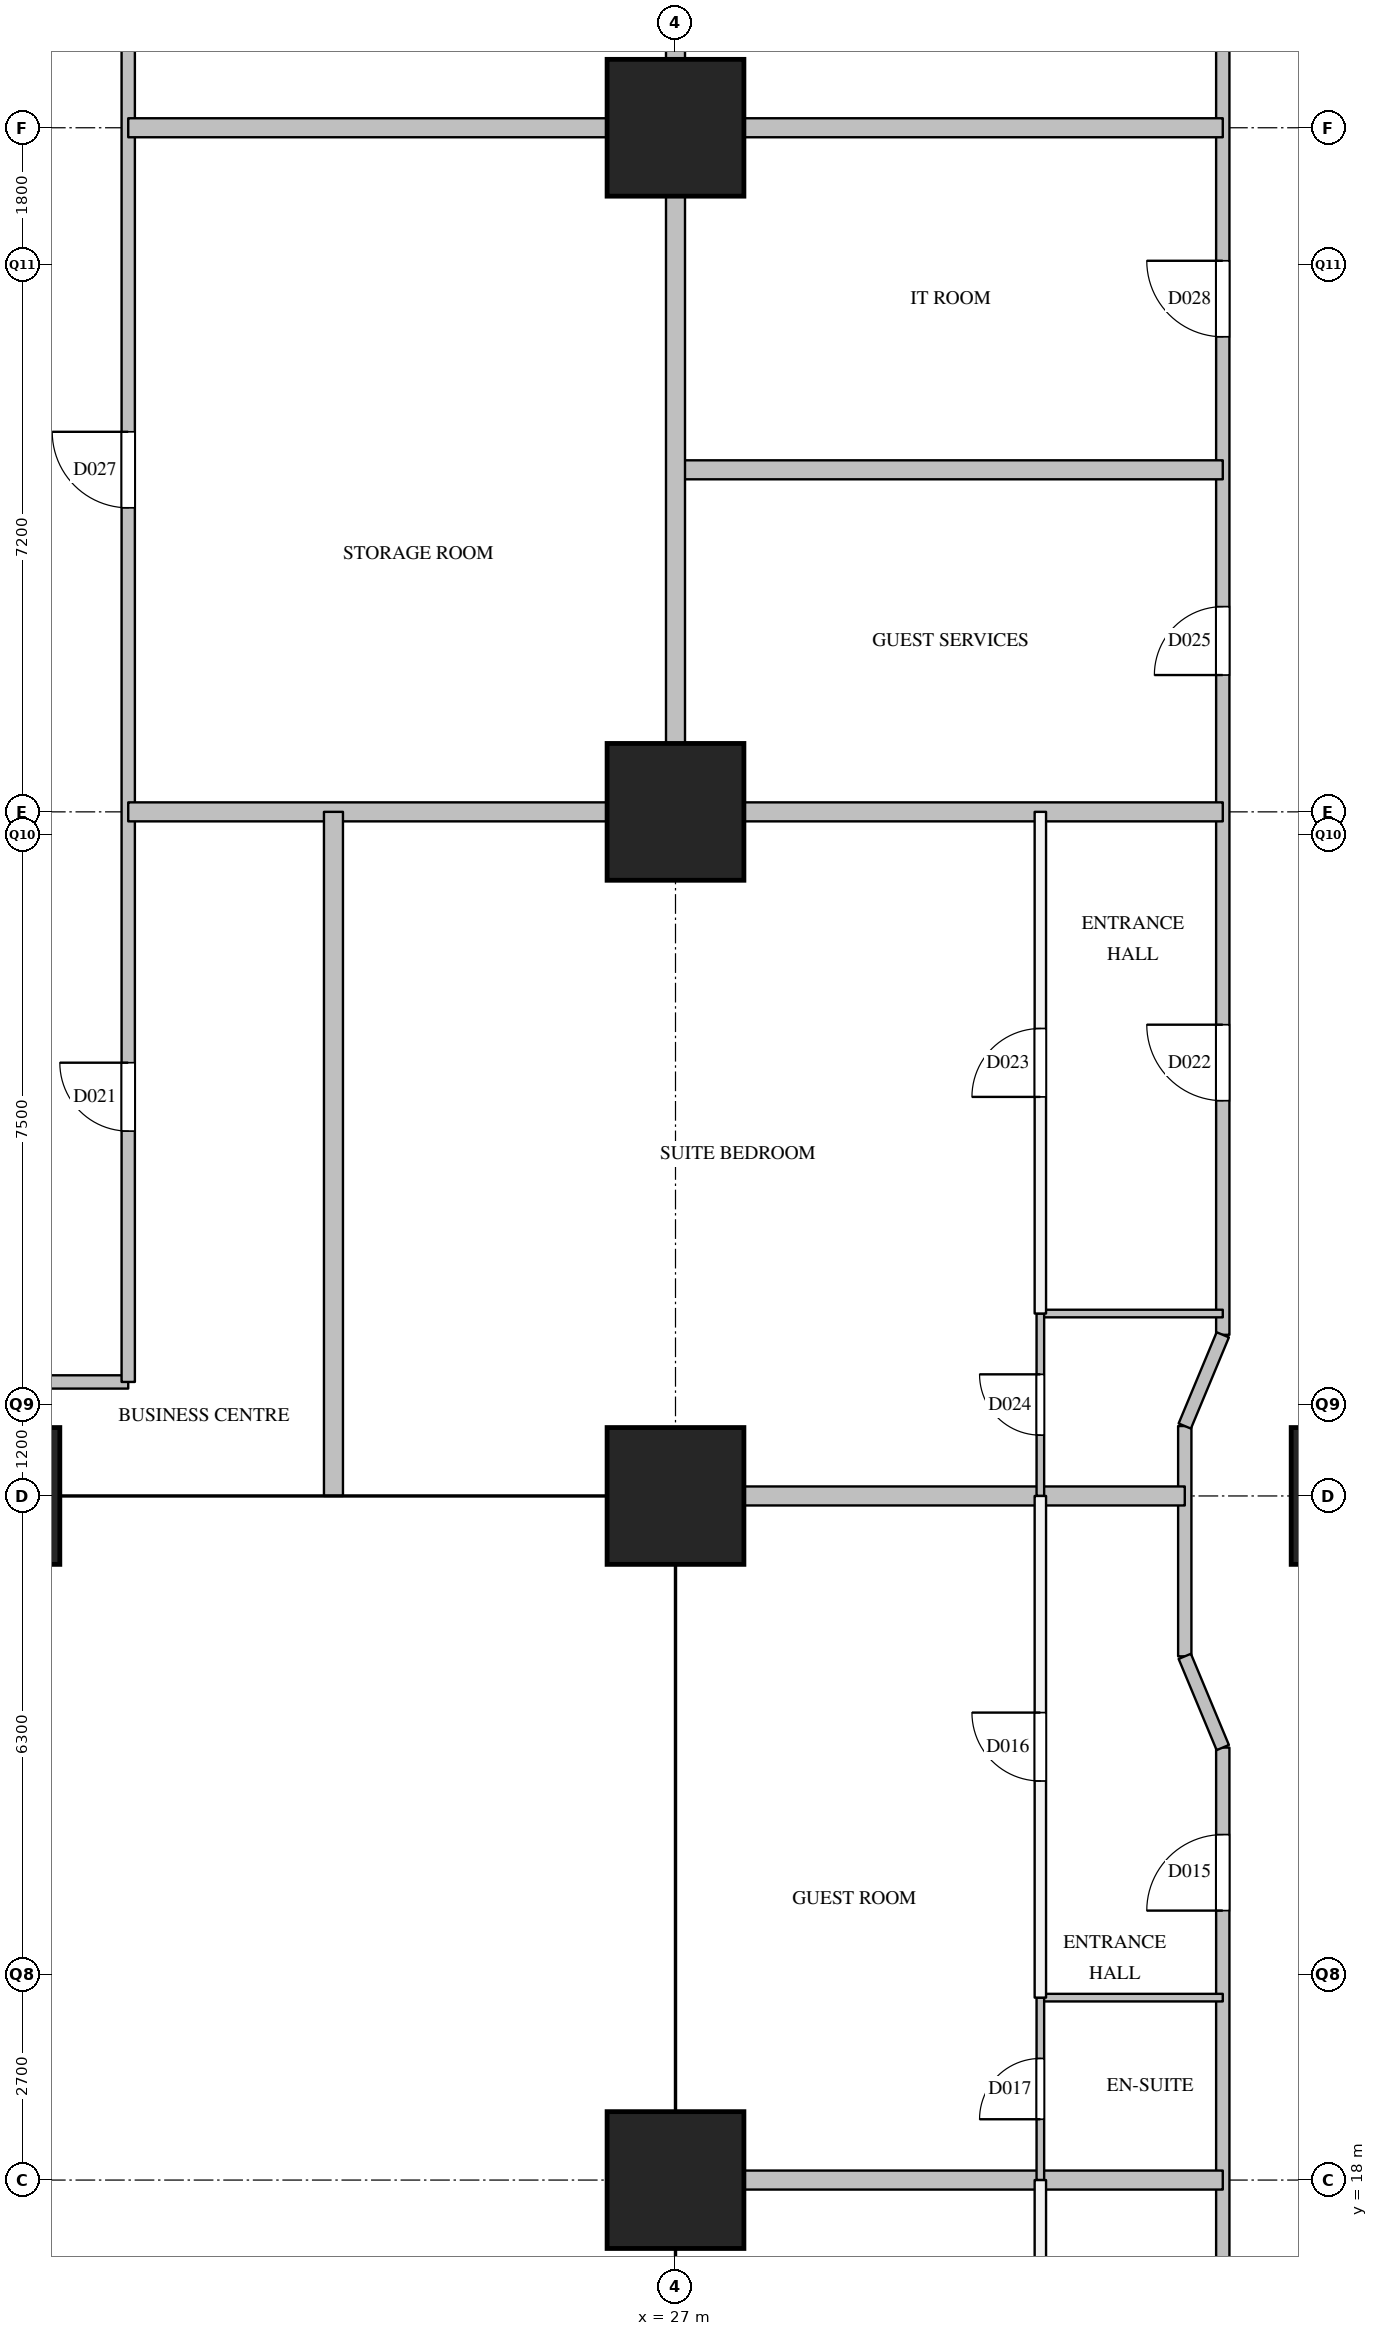
"""IFC4 building model, lengths in metres.
Left out: names, types, materials, properties, quantities, classifications, styles, units other than length and angle.
Written with IfcOpenShell. Run it as: python <this file> out.ifc"""

import sys

from ifc_helpers import new_model, si_unit, direction, frame, frame_2d, origin, origin_2d, place, context, subcontext, project, spatial, rectangle, extrude, element, fill, save


model = new_model("IFC4")
c1 = context("Model", 3, precision=1e-05, world=origin(), true_north=direction((0.0, 1.0)))
c2 = subcontext(c1, "Body", "Model", "MODEL_VIEW")
j1 = project(units=[si_unit("LENGTHUNIT", "METRE"), si_unit("PLANEANGLEUNIT", "RADIAN")], contexts=[c1])
p1 = place(None, origin())
s1 = spatial("IfcSite", under=j1, at=p1, CompositionType="ELEMENT")
p2 = place(p1, origin())
s2 = spatial("IfcBuilding", under=s1, at=p2, CompositionType="ELEMENT")
p3 = place(p2, frame((0.0, 0.0, 104.4)))
s3 = spatial("IfcBuildingStorey", under=s2, at=p3, CompositionType="ELEMENT", Elevation=104.4)
for number, where, z_axis, x_axis in (
    (1, (18.0, 27.0, 0.0), (0.0, 0.0, 1.0), (1.0, 0.0, 0.0)),
    (2, (27.0, 18.0, 0.0), (0.0, 0.0, 1.0), (1.0, 0.0, 0.0)),
    (3, (27.0, 27.0, 0.0), (0.0, 0.0, 1.0), (1.0, 0.0, 0.0)),
    (4, (27.0, 36.0, 0.0), (0.0, 0.0, 1.0), (1.0, 0.0, 0.0)),
    (5, (27.0, 45.0, 0.0), (0.0, 0.0, 1.0), (1.0, 0.0, 0.0)),
    (6, (36.0, 27.0, 0.0), (0.0, 0.0, 1.0), (1.0, 0.0, 0.0)),
):
    element("IfcColumn", number, at=place(p3, frame(where, z_axis=z_axis, x_axis=x_axis)), inside=s3, PredefinedType="COLUMN", context=c2, shape_type="SweptSolid", body=[
        extrude(rectangle(XDim=1.8, YDim=1.8, at=origin_2d()), origin(), (0.0, 0.0, 1.0), 3.8),
    ])
p4 = place(p3, frame((18.0, 28.5, 0.0), z_axis=(0.0, 0.0, 1.0), x_axis=(1.0, 0.0, 0.0)))
e7 = element("IfcWall", 7, at=p4, inside=s3, PredefinedType="PARTITIONING", context=c2, shape_type="SweptSolid", body=[
    extrude(rectangle(XDim=1.8, YDim=0.175, at=frame_2d((0.9, 0.0))), origin(), (0.0, 0.0, 1.0), 3.5),
])
p5 = place(p3, frame((19.8, 28.5, 0.0), z_axis=(0.0, 0.0, 1.0), x_axis=(0.0, 1.0, 0.0)))
e8 = element("IfcWall", 8, at=p5, inside=s3, PredefinedType="PARTITIONING", context=c2, shape_type="SweptSolid", body=[
    extrude(rectangle(XDim=23.3, YDim=0.175, at=frame_2d((11.65, 0.0))), origin(), (0.0, 0.0, 1.0), 3.5),
])
p6 = place(p5, frame((3.3, 0.0, 0.0)))
e9 = element("IfcOpeningElement", 9, at=p6, cuts=e8, PredefinedType="OPENING", context=c2, shape_type="SweptSolid", body=[
    extrude(rectangle(XDim=0.9, YDim=2.1, at=frame_2d((0.45, 1.05))), frame((0.0, 0.097, 0.0), z_axis=(0.0, -1.0, 0.0), x_axis=(1.0, 0.0, 0.0)), (0.0, 0.0, 1.0), 0.195),
])
p7 = place(p5, frame((11.5, 0.0, 0.0)))
e10 = element("IfcOpeningElement", 10, at=p7, cuts=e8, PredefinedType="OPENING", context=c2, shape_type="SweptSolid", body=[
    extrude(rectangle(XDim=1.0, YDim=2.1, at=frame_2d((0.5, 1.05))), frame((0.0, 0.097, 0.0), z_axis=(0.0, -1.0, 0.0), x_axis=(1.0, 0.0, 0.0)), (0.0, 0.0, 1.0), 0.195),
])
p8 = place(p5, frame((19.45, 0.0, 0.0)))
e11 = element("IfcOpeningElement", 11, at=p8, cuts=e8, PredefinedType="OPENING", context=c2, shape_type="SweptSolid", body=[
    extrude(rectangle(XDim=0.9, YDim=2.1, at=frame_2d((0.45, 1.05))), frame((0.0, 0.097, 0.0), z_axis=(0.0, -1.0, 0.0), x_axis=(1.0, 0.0, 0.0)), (0.0, 0.0, 1.0), 0.195),
])
p9 = place(p3, frame((33.7, 24.89, 0.0), z_axis=(0.0, 0.0, 1.0), x_axis=(0.0, 1.0, 0.0)))
e12 = element("IfcWall", 12, at=p9, inside=s3, PredefinedType="PARTITIONING", context=c2, shape_type="SweptSolid", body=[
    extrude(rectangle(XDim=3.03, YDim=0.175, at=frame_2d((1.515, 0.0))), origin(), (0.0, 0.0, 1.0), 2.5),
])
p10 = place(p3, frame((34.2, 7.2, 0.0), z_axis=(0.0, 0.0, 1.0), x_axis=(0.0, 1.0, 0.0)))
e13 = element("IfcWall", 13, at=p10, inside=s3, PredefinedType="PARTITIONING", context=c2, shape_type="SweptSolid", body=[
    extrude(rectangle(XDim=16.49, YDim=0.175, at=frame_2d((8.245, 0.0))), origin(), (0.0, 0.0, 1.0), 3.5),
])
p11 = place(p10, frame((0.45, 0.0, 0.0)))
e14 = element("IfcOpeningElement", 14, at=p11, cuts=e13, PredefinedType="OPENING", context=c2, shape_type="SweptSolid", body=[
    extrude(rectangle(XDim=0.9, YDim=2.1, at=frame_2d((0.45, 1.05))), frame((0.0, 0.097, 0.0), z_axis=(0.0, -1.0, 0.0), x_axis=(1.0, 0.0, 0.0)), (0.0, 0.0, 1.0), 0.195),
])
p12 = place(p10, frame((7.0, 0.0, 0.0)))
e15 = element("IfcOpeningElement", 15, at=p12, cuts=e13, PredefinedType="OPENING", context=c2, shape_type="SweptSolid", body=[
    extrude(rectangle(XDim=1.0, YDim=2.1, at=frame_2d((0.5, 1.05))), frame((0.0, 0.097, 0.0), z_axis=(0.0, -1.0, 0.0), x_axis=(1.0, 0.0, 0.0)), (0.0, 0.0, 1.0), 0.195),
])
p13 = place(p10, frame((14.345, 0.0, 0.0)))
e16 = element("IfcOpeningElement", 16, at=p13, cuts=e13, PredefinedType="OPENING", context=c2, shape_type="SweptSolid", body=[
    extrude(rectangle(XDim=1.0, YDim=2.1, at=frame_2d((0.5, 1.05))), frame((0.0, 0.097, 0.0), z_axis=(0.0, -1.0, 0.0), x_axis=(1.0, 0.0, 0.0)), (0.0, 0.0, 1.0), 0.195),
])
p14 = place(p3, frame((34.2, 29.12, 0.0), z_axis=(0.0, 0.0, 1.0), x_axis=(0.0, 1.0, 0.0)))
e17 = element("IfcWall", 17, at=p14, inside=s3, PredefinedType="PARTITIONING", context=c2, shape_type="SweptSolid", body=[
    extrude(rectangle(XDim=22.68, YDim=0.175, at=frame_2d((11.34, 0.0))), origin(), (0.0, 0.0, 1.0), 3.5),
])
p15 = place(p14, frame((3.08, 0.0, 0.0)))
e18 = element("IfcOpeningElement", 18, at=p15, cuts=e17, PredefinedType="OPENING", context=c2, shape_type="SweptSolid", body=[
    extrude(rectangle(XDim=1.0, YDim=2.1, at=frame_2d((0.5, 1.05))), frame((0.0, 0.097, 0.0), z_axis=(0.0, -1.0, 0.0), x_axis=(1.0, 0.0, 0.0)), (0.0, 0.0, 1.0), 0.195),
])
p16 = place(p14, frame((8.68, 0.0, 0.0)))
e19 = element("IfcOpeningElement", 19, at=p16, cuts=e17, PredefinedType="OPENING", context=c2, shape_type="SweptSolid", body=[
    extrude(rectangle(XDim=0.9, YDim=2.1, at=frame_2d((0.45, 1.05))), frame((0.0, 0.097, 0.0), z_axis=(0.0, -1.0, 0.0), x_axis=(1.0, 0.0, 0.0)), (0.0, 0.0, 1.0), 0.195),
])
p17 = place(p14, frame((13.13, 0.0, 0.0)))
e20 = element("IfcOpeningElement", 20, at=p17, cuts=e17, PredefinedType="OPENING", context=c2, shape_type="SweptSolid", body=[
    extrude(rectangle(XDim=1.0, YDim=2.1, at=frame_2d((0.5, 1.05))), frame((0.0, 0.097, 0.0), z_axis=(0.0, -1.0, 0.0), x_axis=(1.0, 0.0, 0.0)), (0.0, 0.0, 1.0), 0.195),
])
p18 = place(p14, frame((18.83, 0.0, 0.0)))
e21 = element("IfcOpeningElement", 21, at=p18, cuts=e17, PredefinedType="OPENING", context=c2, shape_type="SweptSolid", body=[
    extrude(rectangle(XDim=0.9, YDim=2.1, at=frame_2d((0.45, 1.05))), frame((0.0, 0.097, 0.0), z_axis=(0.0, -1.0, 0.0), x_axis=(1.0, 0.0, 0.0)), (0.0, 0.0, 1.0), 0.195),
])
p19 = place(p3, frame((31.8, 11.4, 0.0), z_axis=(0.0, 0.0, 1.0), x_axis=(0.0, 1.0, 0.0)))
e22 = element("IfcWall", 22, at=p19, inside=s3, PredefinedType="PARTITIONING", context=c2, shape_type="SweptSolid", body=[
    extrude(rectangle(XDim=6.6, YDim=0.15, at=frame_2d((3.3, 0.0))), origin(), (0.0, 0.0, 1.0), 3.5),
])
p20 = place(p19, frame((2.85, 0.0, 0.0)))
e23 = element("IfcOpeningElement", 23, at=p20, cuts=e22, PredefinedType="OPENING", context=c2, shape_type="SweptSolid", body=[
    extrude(rectangle(XDim=0.9, YDim=2.1, at=frame_2d((0.45, 1.05))), frame((0.0, 0.085, 0.0), z_axis=(0.0, -1.0, 0.0), x_axis=(1.0, 0.0, 0.0)), (0.0, 0.0, 1.0), 0.17),
])
p21 = place(p3, frame((31.8, 20.4, 0.0), z_axis=(0.0, 0.0, 1.0), x_axis=(0.0, 1.0, 0.0)))
e24 = element("IfcWall", 24, at=p21, inside=s3, PredefinedType="PARTITIONING", context=c2, shape_type="SweptSolid", body=[
    extrude(rectangle(XDim=6.6, YDim=0.15, at=frame_2d((3.3, 0.0))), origin(), (0.0, 0.0, 1.0), 2.5),
])
p22 = place(p21, frame((2.85, 0.0, 0.0)))
e25 = element("IfcOpeningElement", 25, at=p22, cuts=e24, PredefinedType="OPENING", context=c2, shape_type="SweptSolid", body=[
    extrude(rectangle(XDim=0.9, YDim=2.1, at=frame_2d((0.45, 1.05))), frame((0.0, 0.085, 0.0), z_axis=(0.0, -1.0, 0.0), x_axis=(1.0, 0.0, 0.0)), (0.0, 0.0, 1.0), 0.17),
])
p23 = place(p3, frame((31.8, 29.4, 0.0), z_axis=(0.0, 0.0, 1.0), x_axis=(0.0, 1.0, 0.0)))
e26 = element("IfcWall", 26, at=p23, inside=s3, PredefinedType="PARTITIONING", context=c2, shape_type="SweptSolid", body=[
    extrude(rectangle(XDim=6.6, YDim=0.15, at=frame_2d((3.3, 0.0))), origin(), (0.0, 0.0, 1.0), 3.5),
])
p24 = place(p23, frame((2.85, 0.0, 0.0)))
e27 = element("IfcOpeningElement", 27, at=p24, cuts=e26, PredefinedType="OPENING", context=c2, shape_type="SweptSolid", body=[
    extrude(rectangle(XDim=0.9, YDim=2.1, at=frame_2d((0.45, 1.05))), frame((0.0, 0.085, 0.0), z_axis=(0.0, -1.0, 0.0), x_axis=(1.0, 0.0, 0.0)), (0.0, 0.0, 1.0), 0.17),
])
p25 = place(p3, frame((27.0, 18.0, 0.0), z_axis=(0.0, 0.0, 1.0), x_axis=(1.0, 0.0, 0.0)))
e28 = element("IfcWall", 28, at=p25, inside=s3, PredefinedType="PARTITIONING", context=c2, shape_type="SweptSolid", body=[
    extrude(rectangle(XDim=7.2, YDim=0.25, at=frame_2d((3.6, 0.0))), origin(), (0.0, 0.0, 1.0), 3.5),
])
p26 = place(p3, frame((27.0, 27.0, 0.0), z_axis=(0.0, 0.0, 1.0), x_axis=(1.0, 0.0, 0.0)))
e29 = element("IfcWall", 29, at=p26, inside=s3, PredefinedType="PARTITIONING", context=c2, shape_type="SweptSolid", body=[
    extrude(rectangle(XDim=6.7, YDim=0.25, at=frame_2d((3.35, 0.0))), origin(), (0.0, 0.0, 1.0), 2.5),
])
p27 = place(p3, frame((19.8, 36.0, 0.0), z_axis=(0.0, 0.0, 1.0), x_axis=(1.0, 0.0, 0.0)))
e30 = element("IfcWall", 30, at=p27, inside=s3, PredefinedType="PARTITIONING", context=c2, shape_type="SweptSolid", body=[
    extrude(rectangle(XDim=14.4, YDim=0.25, at=frame_2d((7.2, 0.0))), origin(), (0.0, 0.0, 1.0), 3.5),
])
p28 = place(p3, frame((27.0, 40.5, 0.0), z_axis=(0.0, 0.0, 1.0), x_axis=(1.0, 0.0, 0.0)))
e31 = element("IfcWall", 31, at=p28, inside=s3, PredefinedType="PARTITIONING", context=c2, shape_type="SweptSolid", body=[
    extrude(rectangle(XDim=7.2, YDim=0.25, at=frame_2d((3.6, 0.0))), origin(), (0.0, 0.0, 1.0), 2.5),
])
p29 = place(p3, frame((19.8, 45.0, 0.0), z_axis=(0.0, 0.0, 1.0), x_axis=(1.0, 0.0, 0.0)))
e32 = element("IfcWall", 32, at=p29, inside=s3, PredefinedType="PARTITIONING", context=c2, shape_type="SweptSolid", body=[
    extrude(rectangle(XDim=14.4, YDim=0.25, at=frame_2d((7.2, 0.0))), origin(), (0.0, 0.0, 1.0), 3.5),
])
p30 = place(p3, frame((22.5, 27.0, 0.0), z_axis=(0.0, 0.0, 1.0), x_axis=(0.0, 1.0, 0.0)))
e33 = element("IfcWall", 33, at=p30, inside=s3, PredefinedType="PARTITIONING", context=c2, shape_type="SweptSolid", body=[
    extrude(rectangle(XDim=9.0, YDim=0.25, at=frame_2d((4.5, 0.0))), origin(), (0.0, 0.0, 1.0), 2.5),
])
p31 = place(p3, frame((27.0, 36.0, 0.0), z_axis=(0.0, 0.0, 1.0), x_axis=(0.0, 1.0, 0.0)))
e34 = element("IfcWall", 34, at=p31, inside=s3, PredefinedType="PARTITIONING", context=c2, shape_type="SweptSolid", body=[
    extrude(rectangle(XDim=18.0, YDim=0.25, at=frame_2d((9.0, 0.0))), origin(), (0.0, 0.0, 1.0), 2.5),
])
for number, where, z_axis, x_axis in (
    (35, (31.8, 20.4, 0.0), (0.0, 0.0, 1.0), (1.0, 0.0, 0.0)),
    (36, (31.8, 29.4, 0.0), (0.0, 0.0, 1.0), (1.0, 0.0, 0.0)),
):
    element("IfcWall", number, at=place(p3, frame(where, z_axis=z_axis, x_axis=x_axis)), inside=s3, PredefinedType="PARTITIONING", context=c2, shape_type="SweptSolid", body=[
        extrude(rectangle(XDim=2.4, YDim=0.1, at=frame_2d((1.2, 0.0))), origin(), (0.0, 0.0, 1.0), 3.5),
    ])
p32 = place(p3, frame((31.8, 18.0, 0.0), z_axis=(0.0, 0.0, 1.0), x_axis=(0.0, 1.0, 0.0)))
e37 = element("IfcWall", 37, at=p32, inside=s3, PredefinedType="PARTITIONING", context=c2, shape_type="SweptSolid", body=[
    extrude(rectangle(XDim=2.4, YDim=0.1, at=frame_2d((1.2, 0.0))), origin(), (0.0, 0.0, 1.0), 3.5),
])
p33 = place(p32, frame((0.8, 0.0, 0.0)))
e38 = element("IfcOpeningElement", 38, at=p33, cuts=e37, PredefinedType="OPENING", context=c2, shape_type="SweptSolid", body=[
    extrude(rectangle(XDim=0.8, YDim=2.1, at=frame_2d((0.4, 1.05))), frame((0.0, 0.06, 0.0), z_axis=(0.0, -1.0, 0.0), x_axis=(1.0, 0.0, 0.0)), (0.0, 0.0, 1.0), 0.12),
])
p34 = place(p3, frame((31.8, 27.0, 0.0), z_axis=(0.0, 0.0, 1.0), x_axis=(0.0, 1.0, 0.0)))
e39 = element("IfcWall", 39, at=p34, inside=s3, PredefinedType="PARTITIONING", context=c2, shape_type="SweptSolid", body=[
    extrude(rectangle(XDim=2.4, YDim=0.1, at=frame_2d((1.2, 0.0))), origin(), (0.0, 0.0, 1.0), 2.5),
])
p35 = place(p34, frame((0.8, 0.0, 0.0)))
e40 = element("IfcOpeningElement", 40, at=p35, cuts=e39, PredefinedType="OPENING", context=c2, shape_type="SweptSolid", body=[
    extrude(rectangle(XDim=0.8, YDim=2.1, at=frame_2d((0.4, 1.05))), frame((0.0, 0.06, 0.0), z_axis=(0.0, -1.0, 0.0), x_axis=(1.0, 0.0, 0.0)), (0.0, 0.0, 1.0), 0.12),
])
p36 = place(p3, frame((34.2, 23.69, 0.0), z_axis=(0.0, 0.0, 1.0), x_axis=(-0.384628719983, 0.923071366561, 0.0)))
e41 = element("IfcWall", 41, at=p36, inside=s3, PredefinedType="PARTITIONING", context=c2, shape_type="SweptSolid", body=[
    extrude(rectangle(XDim=1.3, YDim=0.175, at=frame_2d((0.65, 0.0))), origin(), (0.0, 0.0, 1.0), 3.5),
])
p37 = place(p3, frame((33.7, 27.92, 0.0), z_axis=(0.0, 0.0, 1.0), x_axis=(0.384562051588, 0.923099143363, 0.0)))
e42 = element("IfcWall", 42, at=p37, inside=s3, PredefinedType="PARTITIONING", context=c2, shape_type="SweptSolid", body=[
    extrude(rectangle(XDim=1.3, YDim=0.175, at=frame_2d((0.65, 0.0))), origin(), (0.0, 0.0, 1.0), 3.5),
])
p38 = place(p13, origin())
e43 = element("IfcDoor", 43, at=p38, inside=s3, OperationType="SINGLE_SWING_LEFT", PredefinedType="DOOR", context=c2, shape_type="SweptSolid", body=[
    extrude(rectangle(XDim=1.0, YDim=2.1, at=frame_2d((0.5, 1.05))), frame((0.0, 0.025, 0.0), z_axis=(0.0, -1.0, 0.0), x_axis=(1.0, 0.0, 0.0)), (0.0, 0.0, 1.0), 0.05),
])
fill(e16, e43)
p39 = place(p22, origin())
e44 = element("IfcDoor", 44, at=p39, inside=s3, OperationType="SINGLE_SWING_RIGHT", PredefinedType="DOOR", context=c2, shape_type="SweptSolid", body=[
    extrude(rectangle(XDim=0.9, YDim=2.1, at=frame_2d((0.45, 1.05))), frame((0.0, 0.025, 0.0), z_axis=(0.0, -1.0, 0.0), x_axis=(1.0, 0.0, 0.0)), (0.0, 0.0, 1.0), 0.05),
])
fill(e25, e44)
p40 = place(p33, origin())
e45 = element("IfcDoor", 45, at=p40, inside=s3, OperationType="SINGLE_SWING_LEFT", PredefinedType="DOOR", context=c2, shape_type="SweptSolid", body=[
    extrude(rectangle(XDim=0.8, YDim=2.1, at=frame_2d((0.4, 1.05))), frame((0.0, 0.025, 0.0), z_axis=(0.0, -1.0, 0.0), x_axis=(1.0, 0.0, 0.0)), (0.0, 0.0, 1.0), 0.05),
])
fill(e38, e45)
p41 = place(p6, origin())
e46 = element("IfcDoor", 46, at=p41, inside=s3, OperationType="SINGLE_SWING_RIGHT", PredefinedType="DOOR", context=c2, shape_type="SweptSolid", body=[
    extrude(rectangle(XDim=0.9, YDim=2.1, at=frame_2d((0.45, 1.05))), frame((0.0, 0.025, 0.0), z_axis=(0.0, -1.0, 0.0), x_axis=(1.0, 0.0, 0.0)), (0.0, 0.0, 1.0), 0.05),
])
fill(e9, e46)
p42 = place(p15, origin())
e47 = element("IfcDoor", 47, at=p42, inside=s3, OperationType="SINGLE_SWING_RIGHT", PredefinedType="DOOR", context=c2, shape_type="SweptSolid", body=[
    extrude(rectangle(XDim=1.0, YDim=2.1, at=frame_2d((0.5, 1.05))), frame((0.0, 0.025, 0.0), z_axis=(0.0, -1.0, 0.0), x_axis=(1.0, 0.0, 0.0)), (0.0, 0.0, 1.0), 0.05),
])
fill(e18, e47)
p43 = place(p24, origin())
e48 = element("IfcDoor", 48, at=p43, inside=s3, OperationType="SINGLE_SWING_LEFT", PredefinedType="DOOR", context=c2, shape_type="SweptSolid", body=[
    extrude(rectangle(XDim=0.9, YDim=2.1, at=frame_2d((0.45, 1.05))), frame((0.0, 0.025, 0.0), z_axis=(0.0, -1.0, 0.0), x_axis=(1.0, 0.0, 0.0)), (0.0, 0.0, 1.0), 0.05),
])
fill(e27, e48)
p44 = place(p35, origin())
e49 = element("IfcDoor", 49, at=p44, inside=s3, OperationType="SINGLE_SWING_RIGHT", PredefinedType="DOOR", context=c2, shape_type="SweptSolid", body=[
    extrude(rectangle(XDim=0.8, YDim=2.1, at=frame_2d((0.4, 1.05))), frame((0.0, 0.025, 0.0), z_axis=(0.0, -1.0, 0.0), x_axis=(1.0, 0.0, 0.0)), (0.0, 0.0, 1.0), 0.05),
])
fill(e40, e49)
p45 = place(p16, origin())
e50 = element("IfcDoor", 50, at=p45, inside=s3, OperationType="SINGLE_SWING_LEFT", PredefinedType="DOOR", context=c2, shape_type="SweptSolid", body=[
    extrude(rectangle(XDim=0.9, YDim=2.1, at=frame_2d((0.45, 1.05))), frame((0.0, 0.025, 0.0), z_axis=(0.0, -1.0, 0.0), x_axis=(1.0, 0.0, 0.0)), (0.0, 0.0, 1.0), 0.05),
])
fill(e19, e50)
p46 = place(p7, origin())
e51 = element("IfcDoor", 51, at=p46, inside=s3, OperationType="SINGLE_SWING_RIGHT", PredefinedType="DOOR", context=c2, shape_type="SweptSolid", body=[
    extrude(rectangle(XDim=1.0, YDim=2.1, at=frame_2d((0.5, 1.05))), frame((0.0, 0.025, 0.0), z_axis=(0.0, -1.0, 0.0), x_axis=(1.0, 0.0, 0.0)), (0.0, 0.0, 1.0), 0.05),
])
fill(e10, e51)
p47 = place(p17, origin())
e52 = element("IfcDoor", 52, at=p47, inside=s3, OperationType="SINGLE_SWING_RIGHT", PredefinedType="DOOR", context=c2, shape_type="SweptSolid", body=[
    extrude(rectangle(XDim=1.0, YDim=2.1, at=frame_2d((0.5, 1.05))), frame((0.0, 0.025, 0.0), z_axis=(0.0, -1.0, 0.0), x_axis=(1.0, 0.0, 0.0)), (0.0, 0.0, 1.0), 0.05),
])
fill(e20, e52)
save(model, sys.argv[1])
